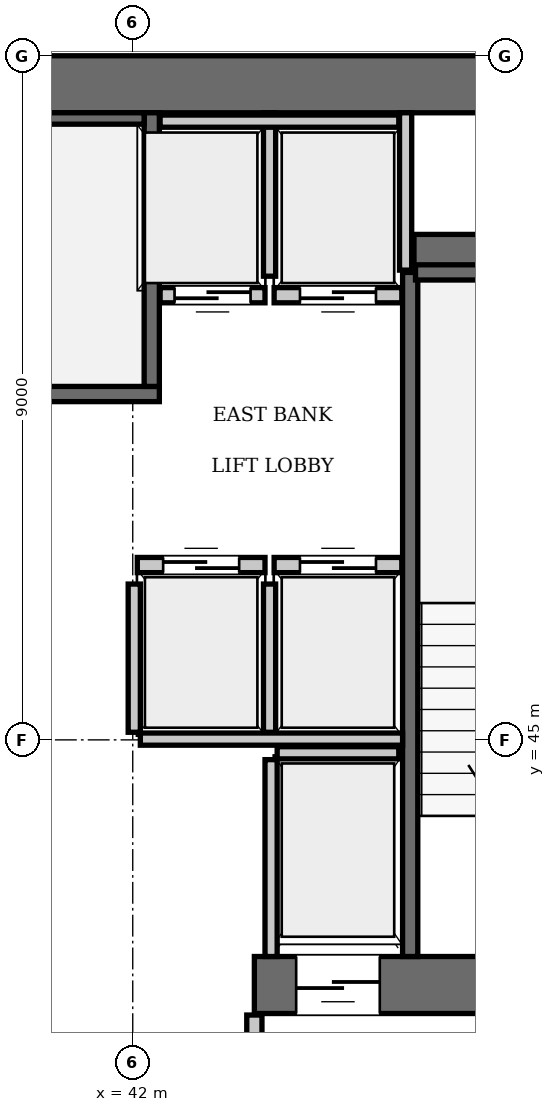
"""IFC4 building model, lengths in metres.
Left out: names, types, materials, properties, quantities, classifications, styles, units other than length and angle.
Written with IfcOpenShell. Run it as: python <this file> out.ifc"""

import sys

from ifc_helpers import new_model, si_unit, direction, frame, frame_2d, origin, place, context, subcontext, project, spatial, rectangle, extrude, element, fill, save


model = new_model("IFC4")
c1 = context("Model", 3, precision=1e-05, world=origin(), true_north=direction((0.0, 1.0)))
c2 = subcontext(c1, "Body", "Model", "MODEL_VIEW")
j1 = project(units=[si_unit("LENGTHUNIT", "METRE"), si_unit("PLANEANGLEUNIT", "RADIAN")], contexts=[c1])
p1 = place(None, origin())
s1 = spatial("IfcSite", under=j1, at=p1, CompositionType="ELEMENT")
p2 = place(p1, origin())
s2 = spatial("IfcBuilding", under=s1, at=p2, CompositionType="ELEMENT")
p3 = place(p2, frame((0.0, 0.0, 162.05)))
s3 = spatial("IfcBuildingStorey", under=s2, at=p3, CompositionType="ELEMENT", Elevation=162.05)
p4 = place(p3, frame((25.2, 53.625, 0.0), z_axis=(0.0, 0.0, 1.0), x_axis=(1.0, 0.0, 0.0)))
e1 = element("IfcWall", 1, at=p4, inside=s3, PredefinedType="SHEAR", context=c2, shape_type="SweptSolid", body=[
    extrude(rectangle(XDim=25.2, YDim=0.75, at=frame_2d((12.6, 0.0))), origin(), (0.0, 0.0, 1.0), 3.85),
])
p5 = place(p3, frame((43.6, 41.775, 0.0), z_axis=(0.0, 0.0, 1.0), x_axis=(1.0, 0.0, 0.0)))
e2 = element("IfcWall", 2, at=p5, inside=s3, PredefinedType="SHEAR", context=c2, shape_type="SweptSolid", body=[
    extrude(rectangle(XDim=6.8, YDim=0.75, at=frame_2d((3.4, 0.0))), origin(), (0.0, 0.0, 1.0), 3.85),
])
p6 = place(p5, frame((3.9, 0.0, 0.0)))
e3 = element("IfcOpeningElement", 3, at=p6, cuts=e2, PredefinedType="OPENING", context=c2, shape_type="SweptSolid", body=[
    extrude(rectangle(XDim=1.15, YDim=2.15, at=frame_2d((0.575, 1.075))), frame((0.0, 0.385, 0.0), z_axis=(0.0, -1.0, 0.0), x_axis=(1.0, 0.0, 0.0)), (0.0, 0.0, 1.0), 0.77),
])
p7 = place(p5, frame((0.55, 0.0, 0.0)))
e4 = element("IfcOpeningElement", 4, at=p7, cuts=e2, PredefinedType="OPENING", context=c2, shape_type="SweptSolid", body=[
    extrude(rectangle(XDim=1.1, YDim=2.2, at=frame_2d((0.55, 1.1))), frame((0.0, 0.385, 0.0), z_axis=(0.0, -1.0, 0.0), x_axis=(1.0, 0.0, 0.0)), (0.0, 0.0, 1.0), 0.77),
])
p8 = place(p3, frame((45.7, 51.4, 0.0), z_axis=(0.0, 0.0, 1.0), x_axis=(1.0, 0.0, 0.0)))
e5 = element("IfcWall", 5, at=p8, inside=s3, PredefinedType="SHEAR", context=c2, shape_type="SweptSolid", body=[
    extrude(rectangle(XDim=3.95, YDim=0.5, at=frame_2d((1.975, 0.0))), origin(), (0.0, 0.0, 1.0), 3.85),
])
p9 = place(p3, frame((33.25, 49.55, 0.0), z_axis=(0.0, 0.0, 1.0), x_axis=(1.0, 0.0, 0.0)))
e6 = element("IfcWall", 6, at=p9, inside=s3, PredefinedType="SOLIDWALL", context=c2, shape_type="SweptSolid", body=[
    extrude(rectangle(XDim=9.1, YDim=0.2, at=frame_2d((4.55, 0.0))), origin(), (0.0, 0.0, 1.0), 3.61),
])
p10 = place(p3, frame((42.25, 49.65, 0.0), z_axis=(0.0, 0.0, 1.0), x_axis=(0.0, 1.0, 0.0)))
e7 = element("IfcWall", 7, at=p10, inside=s3, PredefinedType="SOLIDWALL", context=c2, shape_type="SweptSolid", body=[
    extrude(rectangle(XDim=3.6, YDim=0.2, at=frame_2d((1.8, 0.0))), origin(), (0.0, 0.0, 1.0), 3.61),
])
p11 = place(p3, frame((33.45, 53.175, 0.0), z_axis=(0.0, 0.0, 1.0), x_axis=(1.0, 0.0, 0.0)))
e8 = element("IfcWall", 8, at=p11, inside=s3, PredefinedType="SOLIDWALL", context=c2, shape_type="SweptSolid", body=[
    extrude(rectangle(XDim=8.7, YDim=0.15, at=frame_2d((4.35, 0.0))), origin(), (0.0, 0.0, 1.0), 3.61),
])
p12 = place(p3, frame((45.65, 42.15, 0.0), z_axis=(0.0, 0.0, 1.0), x_axis=(0.0, 1.0, 0.0)))
e9 = element("IfcWall", 9, at=p12, inside=s3, PredefinedType="SOLIDWALL", context=c2, shape_type="SweptSolid", body=[
    extrude(rectangle(XDim=9.0, YDim=0.2, at=frame_2d((4.5, 0.0))), origin(), (0.0, 0.0, 1.0), 3.61),
])
p13 = place(p3, frame((45.72, 51.15, 0.0), z_axis=(0.0, 0.0, 1.0), x_axis=(1.0, 0.0, 0.0)))
e10 = element("IfcWall", 10, at=p13, inside=s3, PredefinedType="SOLIDWALL", context=c2, shape_type="SweptSolid", body=[
    extrude(rectangle(XDim=3.5, YDim=0.2, at=frame_2d((1.75, 0.0))), origin(), (0.0, 0.0, 1.0), 3.61),
])
p14 = place(p3, frame((42.06, 47.3, 0.0), z_axis=(0.0, 0.0, 1.0), x_axis=(1.0, 0.0, 0.0)))
e11 = element("IfcWall", 11, at=p14, inside=s3, PredefinedType="SOLIDWALL", context=c2, shape_type="SweptSolid", body=[
    extrude(rectangle(XDim=1.68, YDim=0.2, at=frame_2d((0.84, 0.0))), origin(), (0.0, 0.0, 1.0), 3.61),
])
p15 = place(p14, frame((0.34, 0.0, 0.0)))
e12 = element("IfcOpeningElement", 12, at=p15, cuts=e11, PredefinedType="OPENING", context=c2, shape_type="SweptSolid", body=[
    extrude(rectangle(XDim=1.0, YDim=2.15, at=frame_2d((0.5, 1.075))), frame((0.0, 0.11, 0.0), z_axis=(0.0, -1.0, 0.0), x_axis=(1.0, 0.0, 0.0)), (0.0, 0.0, 1.0), 0.22),
])
p16 = place(p3, frame((43.86, 47.3, 0.0), z_axis=(0.0, 0.0, 1.0), x_axis=(1.0, 0.0, 0.0)))
e13 = element("IfcWall", 13, at=p16, inside=s3, PredefinedType="SOLIDWALL", context=c2, shape_type="SweptSolid", body=[
    extrude(rectangle(XDim=1.68, YDim=0.2, at=frame_2d((0.84, 0.0))), origin(), (0.0, 0.0, 1.0), 3.61),
])
p17 = place(p16, frame((0.34, 0.0, 0.0)))
e14 = element("IfcOpeningElement", 14, at=p17, cuts=e13, PredefinedType="OPENING", context=c2, shape_type="SweptSolid", body=[
    extrude(rectangle(XDim=1.0, YDim=2.15, at=frame_2d((0.5, 1.075))), frame((0.0, 0.11, 0.0), z_axis=(0.0, -1.0, 0.0), x_axis=(1.0, 0.0, 0.0)), (0.0, 0.0, 1.0), 0.22),
])
p18 = place(p3, frame((42.36, 50.85, 0.0), z_axis=(0.0, 0.0, 1.0), x_axis=(1.0, 0.0, 0.0)))
e15 = element("IfcWall", 15, at=p18, inside=s3, PredefinedType="SOLIDWALL", context=c2, shape_type="SweptSolid", body=[
    extrude(rectangle(XDim=1.38, YDim=0.2, at=frame_2d((0.69, 0.0))), origin(), (0.0, 0.0, 1.0), 3.61),
])
p19 = place(p18, frame((0.19, 0.0, 0.0)))
e16 = element("IfcOpeningElement", 16, at=p19, cuts=e15, PredefinedType="OPENING", context=c2, shape_type="SweptSolid", body=[
    extrude(rectangle(XDim=1.0, YDim=2.15, at=frame_2d((0.5, 1.075))), frame((0.0, 0.11, 0.0), z_axis=(0.0, -1.0, 0.0), x_axis=(1.0, 0.0, 0.0)), (0.0, 0.0, 1.0), 0.22),
])
p20 = place(p3, frame((43.86, 50.85, 0.0), z_axis=(0.0, 0.0, 1.0), x_axis=(1.0, 0.0, 0.0)))
e17 = element("IfcWall", 17, at=p20, inside=s3, PredefinedType="SOLIDWALL", context=c2, shape_type="SweptSolid", body=[
    extrude(rectangle(XDim=1.68, YDim=0.2, at=frame_2d((0.84, 0.0))), origin(), (0.0, 0.0, 1.0), 3.61),
])
p21 = place(p20, frame((0.34, 0.0, 0.0)))
e18 = element("IfcOpeningElement", 18, at=p21, cuts=e17, PredefinedType="OPENING", context=c2, shape_type="SweptSolid", body=[
    extrude(rectangle(XDim=1.0, YDim=2.15, at=frame_2d((0.5, 1.075))), frame((0.0, 0.11, 0.0), z_axis=(0.0, -1.0, 0.0), x_axis=(1.0, 0.0, 0.0)), (0.0, 0.0, 1.0), 0.22),
])
p22 = place(p3, frame((43.9, 44.83, 0.0), z_axis=(0.0, 0.0, 1.0), x_axis=(1.0, 0.0, 0.0)))
e19 = element("IfcWall", 19, at=p22, inside=s3, PredefinedType="SOLIDWALL", context=c2, shape_type="SweptSolid", body=[
    extrude(rectangle(XDim=1.6, YDim=0.16, at=frame_2d((0.8, 0.0))), origin(), (0.0, 0.0, 1.0), 3.61),
])
p23 = place(p3, frame((43.82, 42.15, 0.0), z_axis=(0.0, 0.0, 1.0), x_axis=(0.0, 1.0, 0.0)))
e20 = element("IfcWall", 20, at=p23, inside=s3, PredefinedType="SOLIDWALL", context=c2, shape_type="SweptSolid", body=[
    extrude(rectangle(XDim=2.59, YDim=0.16, at=frame_2d((1.295, 0.0))), origin(), (0.0, 0.0, 1.0), 3.61),
])
for number, where, z_axis, x_axis in (
    (21, (42.02, 45.1, 0.0), (0.0, 0.0, 1.0), (0.0, 1.0, 0.0)),
    (22, (43.8, 45.1, 0.0), (0.0, 0.0, 1.0), (0.0, 1.0, 0.0)),
):
    element("IfcWall", number, at=place(p3, frame(where, z_axis=z_axis, x_axis=x_axis)), inside=s3, PredefinedType="SOLIDWALL", context=c2, shape_type="SweptSolid", body=[
        extrude(rectangle(XDim=1.95, YDim=0.16, at=frame_2d((0.975, 0.0))), origin(), (0.0, 0.0, 1.0), 3.61),
    ])
p24 = place(p3, frame((42.1, 45.01, 0.0), z_axis=(0.0, 0.0, 1.0), x_axis=(1.0, 0.0, 0.0)))
e23 = element("IfcWall", 23, at=p24, inside=s3, PredefinedType="SOLIDWALL", context=c2, shape_type="SweptSolid", body=[
    extrude(rectangle(XDim=3.45, YDim=0.16, at=frame_2d((1.725, 0.0))), origin(), (0.0, 0.0, 1.0), 3.61),
])
p25 = place(p3, frame((45.59, 51.18, 0.0), z_axis=(0.0, 0.0, 1.0), x_axis=(0.0, 1.0, 0.0)))
e24 = element("IfcWall", 24, at=p25, inside=s3, PredefinedType="SOLIDWALL", context=c2, shape_type="SweptSolid", body=[
    extrude(rectangle(XDim=2.07, YDim=0.16, at=frame_2d((1.035, 0.0))), origin(), (0.0, 0.0, 1.0), 3.61),
])
p26 = place(p3, frame((43.8, 51.1, 0.0), z_axis=(0.0, 0.0, 1.0), x_axis=(0.0, 1.0, 0.0)))
e25 = element("IfcWall", 25, at=p26, inside=s3, PredefinedType="SOLIDWALL", context=c2, shape_type="SweptSolid", body=[
    extrude(rectangle(XDim=2.15, YDim=0.16, at=frame_2d((1.075, 0.0))), origin(), (0.0, 0.0, 1.0), 3.61),
])
p27 = place(p3, frame((42.36, 53.14, 0.0), z_axis=(0.0, 0.0, 1.0), x_axis=(1.0, 0.0, 0.0)))
e26 = element("IfcWall", 26, at=p27, inside=s3, PredefinedType="SOLIDWALL", context=c2, shape_type="SweptSolid", body=[
    extrude(rectangle(XDim=3.14, YDim=0.16, at=frame_2d((1.57, 0.0))), origin(), (0.0, 0.0, 1.0), 3.61),
])
p28 = place(p3, frame((43.6, 38.31, 0.0), z_axis=(0.0, 0.0, 1.0), x_axis=(0.0, 1.0, 0.0)))
e27 = element("IfcWall", 27, at=p28, inside=s3, PredefinedType="PARTITIONING", context=c2, shape_type="SweptSolid", body=[
    extrude(rectangle(XDim=3.07, YDim=0.2, at=frame_2d((1.535, 0.0))), origin(), (0.0, 0.0, 1.0), 3.61),
])
p29 = place(p15, origin())
e28 = element("IfcDoor", 28, at=p29, inside=s3, OperationType="SLIDING_TO_LEFT", PredefinedType="DOOR", context=c2, shape_type="SweptSolid", body=[
    extrude(rectangle(XDim=1.0, YDim=2.15, at=frame_2d((0.5, 1.075))), frame((0.0, 0.025, 0.0), z_axis=(0.0, -1.0, 0.0), x_axis=(1.0, 0.0, 0.0)), (0.0, 0.0, 1.0), 0.05),
])
fill(e12, e28)
p30 = place(p17, origin())
e29 = element("IfcDoor", 29, at=p30, inside=s3, OperationType="SLIDING_TO_LEFT", PredefinedType="DOOR", context=c2, shape_type="SweptSolid", body=[
    extrude(rectangle(XDim=1.0, YDim=2.15, at=frame_2d((0.5, 1.075))), frame((0.0, 0.025, 0.0), z_axis=(0.0, -1.0, 0.0), x_axis=(1.0, 0.0, 0.0)), (0.0, 0.0, 1.0), 0.05),
])
fill(e14, e29)
p31 = place(p19, frame((1.0, 0.0, 0.0), z_axis=(0.0, 0.0, 1.0), x_axis=(-1.0, 0.0, 0.0)))
e30 = element("IfcDoor", 30, at=p31, inside=s3, OperationType="SLIDING_TO_LEFT", PredefinedType="DOOR", context=c2, shape_type="SweptSolid", body=[
    extrude(rectangle(XDim=1.0, YDim=2.15, at=frame_2d((0.5, 1.075))), frame((0.0, 0.025, 0.0), z_axis=(0.0, -1.0, 0.0), x_axis=(1.0, 0.0, 0.0)), (0.0, 0.0, 1.0), 0.05),
])
fill(e16, e30)
p32 = place(p21, frame((1.0, 0.0, 0.0), z_axis=(0.0, 0.0, 1.0), x_axis=(-1.0, 0.0, 0.0)))
e31 = element("IfcDoor", 31, at=p32, inside=s3, OperationType="SLIDING_TO_LEFT", PredefinedType="DOOR", context=c2, shape_type="SweptSolid", body=[
    extrude(rectangle(XDim=1.0, YDim=2.15, at=frame_2d((0.5, 1.075))), frame((0.0, 0.025, 0.0), z_axis=(0.0, -1.0, 0.0), x_axis=(1.0, 0.0, 0.0)), (0.0, 0.0, 1.0), 0.05),
])
fill(e18, e31)
p33 = place(p7, frame((1.1, 0.0, 0.0), z_axis=(0.0, 0.0, 1.0), x_axis=(-1.0, 0.0, 0.0)))
e32 = element("IfcDoor", 32, at=p33, inside=s3, OperationType="SLIDING_TO_LEFT", PredefinedType="DOOR", context=c2, shape_type="SweptSolid", body=[
    extrude(rectangle(XDim=1.1, YDim=2.2, at=frame_2d((0.55, 1.1))), frame((0.0, 0.025, 0.0), z_axis=(0.0, -1.0, 0.0), x_axis=(1.0, 0.0, 0.0)), (0.0, 0.0, 1.0), 0.05),
])
fill(e4, e32)
save(model, sys.argv[1])
